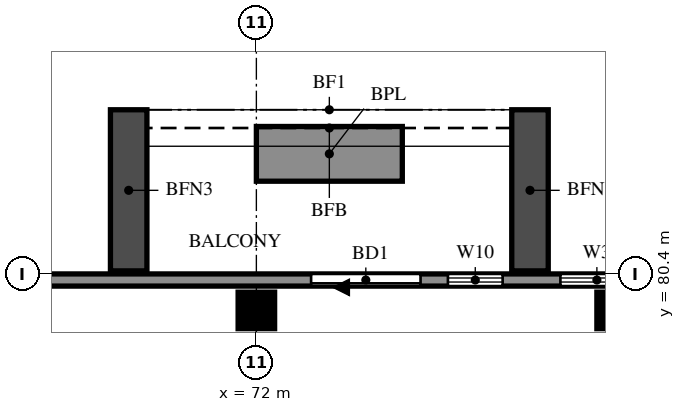
"""IFC4 building model, lengths in metres.
Left out: names, types, materials, properties, quantities, classifications, styles, units other than length and angle.
Written with IfcOpenShell. Run it as: python <this file> out.ifc"""

import sys

from ifc_helpers import new_model, si_unit, direction, frame, frame_2d, origin, origin_2d, place, context, subcontext, project, spatial, rectangle, extrude, source, transform, mapped, element, fill, save


model = new_model("IFC4")
c1 = context("Model", 3, precision=1e-05, world=origin(), true_north=direction((0.0, 1.0)))
c2 = subcontext(c1, "Body", "Model", "MODEL_VIEW")
j1 = project(units=[si_unit("LENGTHUNIT", "METRE"), si_unit("PLANEANGLEUNIT", "RADIAN")], contexts=[c1])
p1 = place(None, origin())
s1 = spatial("IfcSite", under=j1, at=p1, CompositionType="ELEMENT")
p2 = place(p1, origin())
s2 = spatial("IfcBuilding", under=s1, at=p2, CompositionType="ELEMENT")
p3 = place(p2, frame((0.0, 0.0, 260.5)))
s3 = spatial("IfcBuildingStorey", under=s2, at=p3, CompositionType="ELEMENT", Elevation=260.5)
m1 = source(origin(), c2, "Body", "SweptSolid", [
    extrude(rectangle(XDim=0.6, YDim=0.6, at=origin_2d()), origin(), (0.0, 0.0, 1.0), 3.22),
])
for number, where, z_axis, x_axis in (
    (1, (72.0, 79.8, 0.0), (0.0, 0.0, 1.0), (1.0, 0.0, 0.0)),
    (2, (77.9, 79.8, 0.0), (0.0, 0.0, 1.0), (1.0, 0.0, 0.0)),
):
    element("IfcColumn", number, at=place(p3, frame(where, z_axis=z_axis, x_axis=x_axis)), inside=s3, PredefinedType="COLUMN", context=c2, shape_type="MappedRepresentation", body=[
        mapped(m1, transform((0.0, 0.0, 0.0))),
    ])
p4 = place(p3, frame((78.6, 80.3, 0.0), z_axis=(0.0, 0.0, 1.0), x_axis=(-1.0, 0.0, 0.0)))
e3 = element("IfcWall", 3, at=p4, inside=s3, PredefinedType="SOLIDWALL", context=c2, shape_type="SweptSolid", body=[
    extrude(rectangle(XDim=56.6, YDim=0.2, at=frame_2d((28.3, 0.0))), origin(), (0.0, 0.0, 1.0), 3.22),
])
p5 = place(p4, frame((3.9, 0.0, 0.0)))
e4 = element("IfcOpeningElement", 4, at=p5, cuts=e3, PredefinedType="OPENING", context=c2, shape_type="SweptSolid", body=[
    extrude(rectangle(XDim=1.8, YDim=2.4, at=frame_2d((0.9, 1.2))), frame((0.0, 0.11, 0.0), z_axis=(0.0, -1.0, 0.0), x_axis=(1.0, 0.0, 0.0)), (0.0, 0.0, 1.0), 0.22),
])
p6 = place(p4, frame((50.433, 0.0, 0.6)))
e5 = element("IfcOpeningElement", 5, at=p6, cuts=e3, PredefinedType="OPENING", context=c2, shape_type="SweptSolid", body=[
    extrude(rectangle(XDim=2.4, YDim=2.4, at=frame_2d((1.2, 1.2))), frame((0.0, 0.11, 0.0), z_axis=(0.0, -1.0, 0.0), x_axis=(1.0, 0.0, 0.0)), (0.0, 0.0, 1.0), 0.22),
])
p7 = place(p4, frame((53.367, 0.0, 0.6)))
e6 = element("IfcOpeningElement", 6, at=p7, cuts=e3, PredefinedType="OPENING", context=c2, shape_type="SweptSolid", body=[
    extrude(rectangle(XDim=2.4, YDim=2.4, at=frame_2d((1.2, 1.2))), frame((0.0, 0.11, 0.0), z_axis=(0.0, -1.0, 0.0), x_axis=(1.0, 0.0, 0.0)), (0.0, 0.0, 1.0), 0.22),
])
p8 = place(p4, frame((0.4, 0.0, 0.6)))
e7 = element("IfcOpeningElement", 7, at=p8, cuts=e3, PredefinedType="OPENING", context=c2, shape_type="SweptSolid", body=[
    extrude(rectangle(XDim=1.2, YDim=2.4, at=frame_2d((0.6, 1.2))), frame((0.0, 0.11, 0.0), z_axis=(0.0, -1.0, 0.0), x_axis=(1.0, 0.0, 0.0)), (0.0, 0.0, 1.0), 0.22),
])
p9 = place(p4, frame((2.55, 0.0, 0.6)))
e8 = element("IfcOpeningElement", 8, at=p9, cuts=e3, PredefinedType="OPENING", context=c2, shape_type="SweptSolid", body=[
    extrude(rectangle(XDim=0.9, YDim=2.4, at=frame_2d((0.45, 1.2))), frame((0.0, 0.11, 0.0), z_axis=(0.0, -1.0, 0.0), x_axis=(1.0, 0.0, 0.0)), (0.0, 0.0, 1.0), 0.22),
])
for number, where, z_axis, x_axis in (
    (9, (76.5, 80.45, 0.0), (0.0, 0.0, 1.0), (0.0, 1.0, 0.0)),
    (10, (69.9, 80.45, 0.0), (0.0, 0.0, 1.0), (0.0, 1.0, 0.0)),
):
    element("IfcWall", number, at=place(p3, frame(where, z_axis=z_axis, x_axis=x_axis)), inside=s3, PredefinedType="SOLIDWALL", context=c2, shape_type="SweptSolid", body=[
        extrude(rectangle(XDim=2.65, YDim=0.6, at=frame_2d((1.325, 0.0))), origin(), (0.0, 0.0, 1.0), 2.85),
    ])
p10 = place(p3, frame((74.4, 82.375, 0.0), z_axis=(0.0, 0.0, 1.0), x_axis=(-1.0, 0.0, 0.0)))
e11 = element("IfcWall", 11, at=p10, inside=s3, PredefinedType="SOLIDWALL", context=c2, shape_type="SweptSolid", body=[
    extrude(rectangle(XDim=2.4, YDim=0.9, at=frame_2d((1.2, 0.0))), origin(), (0.0, 0.0, 1.0), 0.9),
])
p11 = place(p5, origin())
e12 = element("IfcDoor", 12, at=p11, inside=s3, OperationType="DOUBLE_DOOR_SLIDING", PredefinedType="DOOR", context=c2, shape_type="SweptSolid", body=[
    extrude(rectangle(XDim=1.8, YDim=2.4, at=frame_2d((0.9, 1.2))), frame((0.0, 0.025, 0.0), z_axis=(0.0, -1.0, 0.0), x_axis=(1.0, 0.0, 0.0)), (0.0, 0.0, 1.0), 0.05),
])
fill(e4, e12)
p12 = place(p8, origin())
e13 = element("IfcWindow", 13, at=p12, inside=s3, PartitioningType="SINGLE_PANEL", PredefinedType="WINDOW", context=c2, shape_type="SweptSolid", body=[
    extrude(rectangle(XDim=1.2, YDim=2.4, at=frame_2d((0.6, 1.2))), frame((0.0, 0.03, 0.0), z_axis=(0.0, -1.0, 0.0), x_axis=(1.0, 0.0, 0.0)), (0.0, 0.0, 1.0), 0.06),
])
fill(e7, e13)
p13 = place(p9, origin())
e14 = element("IfcWindow", 14, at=p13, inside=s3, PartitioningType="SINGLE_PANEL", PredefinedType="WINDOW", context=c2, shape_type="SweptSolid", body=[
    extrude(rectangle(XDim=0.9, YDim=2.4, at=frame_2d((0.45, 1.2))), frame((0.0, 0.03, 0.0), z_axis=(0.0, -1.0, 0.0), x_axis=(1.0, 0.0, 0.0)), (0.0, 0.0, 1.0), 0.06),
])
fill(e8, e14)
save(model, sys.argv[1])
